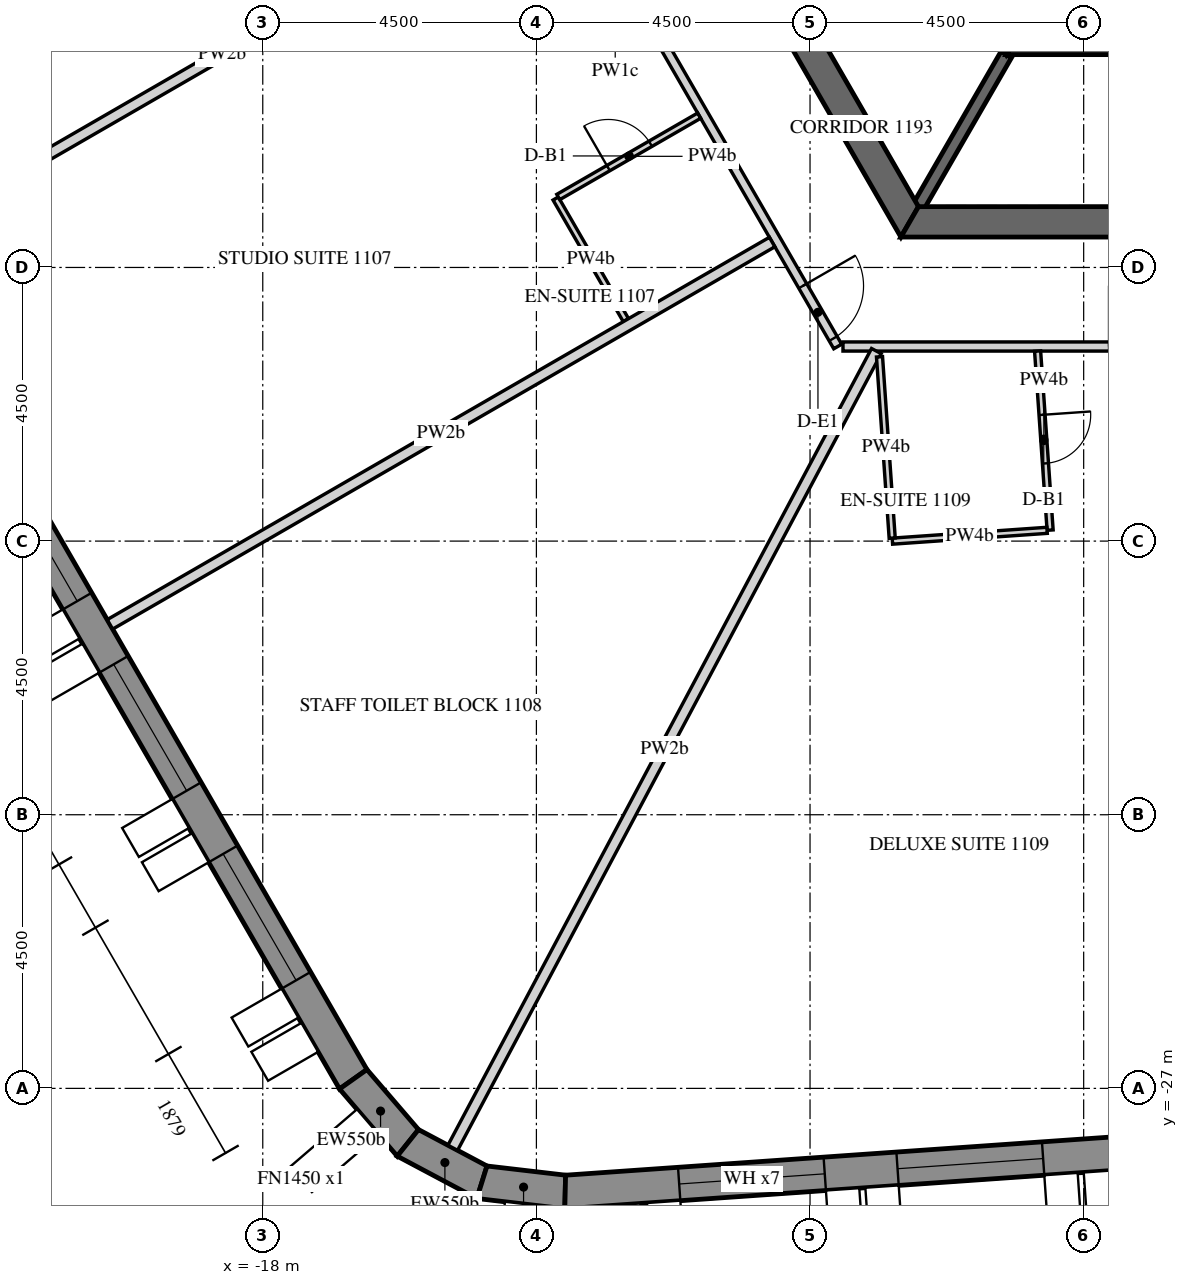
"""IFC4 building model, lengths in metres.
Left out: names, types, materials, properties, quantities, classifications, styles, units other than length and angle.
Written with IfcOpenShell. Run it as: python <this file> out.ifc"""

import sys

from ifc_helpers import new_model, si_unit, direction, frame, frame_2d, origin, place, context, subcontext, project, spatial, polyline, rectangle, outline, extrude, element, fill, save


model = new_model("IFC4")
c1 = context("Model", 3, precision=1e-05, world=origin(), true_north=direction((0.0, 1.0)))
c2 = subcontext(c1, "Body", "Model", "MODEL_VIEW")
j1 = project(units=[si_unit("LENGTHUNIT", "METRE"), si_unit("PLANEANGLEUNIT", "RADIAN")], contexts=[c1])
p1 = place(None, origin())
s1 = spatial("IfcSite", under=j1, at=p1, CompositionType="ELEMENT")
p2 = place(p1, origin())
s2 = spatial("IfcBuilding", under=s1, at=p2, CompositionType="ELEMENT")
p3 = place(p2, frame((0.0, 0.0, 152.7)))
s3 = spatial("IfcBuildingStorey", under=s2, at=p3, CompositionType="ELEMENT", Elevation=152.7)
p4 = place(p3, frame((-30.391, -2.811, 0.0), z_axis=(0.0, 0.0, 1.0), x_axis=(0.499998569178, -0.866026229868, 0.0)))
e1 = element("IfcWall", 1, at=p4, inside=s3, PredefinedType="SOLIDWALL", context=c2, shape_type="SweptSolid", body=[
    extrude(outline(polyline([(-0.022, -0.275), (27.783, -0.275), (27.732, 0.275), (0.022, 0.275), (-0.022, -0.275)])), origin(), (0.0, 0.0, 1.0), 3.75),
])
p5 = place(p4, frame((1.879, 0.0, 0.9)))
e2 = element("IfcOpeningElement", 2, at=p5, cuts=e1, PredefinedType="OPENING", context=c2, shape_type="SweptSolid", body=[
    extrude(rectangle(XDim=2.4, YDim=2.4, at=frame_2d((1.2, 1.2))), frame((0.0, 0.285, 0.0), z_axis=(0.0, -1.0, 0.0), x_axis=(1.0, 0.0, 0.0)), (0.0, 0.0, 1.0), 0.57),
])
p6 = place(p4, frame((5.479, 0.0, 0.9)))
e3 = element("IfcOpeningElement", 3, at=p6, cuts=e1, PredefinedType="OPENING", context=c2, shape_type="SweptSolid", body=[
    extrude(rectangle(XDim=2.4, YDim=2.4, at=frame_2d((1.2, 1.2))), frame((0.0, 0.285, 0.0), z_axis=(0.0, -1.0, 0.0), x_axis=(1.0, 0.0, 0.0)), (0.0, 0.0, 1.0), 0.57),
])
p7 = place(p4, frame((9.079, 0.0, 0.9)))
e4 = element("IfcOpeningElement", 4, at=p7, cuts=e1, PredefinedType="OPENING", context=c2, shape_type="SweptSolid", body=[
    extrude(rectangle(XDim=2.4, YDim=2.4, at=frame_2d((1.2, 1.2))), frame((0.0, 0.285, 0.0), z_axis=(0.0, -1.0, 0.0), x_axis=(1.0, 0.0, 0.0)), (0.0, 0.0, 1.0), 0.57),
])
p8 = place(p4, frame((12.679, 0.0, 0.9)))
e5 = element("IfcOpeningElement", 5, at=p8, cuts=e1, PredefinedType="OPENING", context=c2, shape_type="SweptSolid", body=[
    extrude(rectangle(XDim=2.4, YDim=2.4, at=frame_2d((1.2, 1.2))), frame((0.0, 0.285, 0.0), z_axis=(0.0, -1.0, 0.0), x_axis=(1.0, 0.0, 0.0)), (0.0, 0.0, 1.0), 0.57),
])
p9 = place(p4, frame((16.279, 0.0, 0.9)))
e6 = element("IfcOpeningElement", 6, at=p9, cuts=e1, PredefinedType="OPENING", context=c2, shape_type="SweptSolid", body=[
    extrude(rectangle(XDim=2.4, YDim=2.4, at=frame_2d((1.2, 1.2))), frame((0.0, 0.285, 0.0), z_axis=(0.0, -1.0, 0.0), x_axis=(1.0, 0.0, 0.0)), (0.0, 0.0, 1.0), 0.57),
])
p10 = place(p4, frame((19.879, 0.0, 0.9)))
e7 = element("IfcOpeningElement", 7, at=p10, cuts=e1, PredefinedType="OPENING", context=c2, shape_type="SweptSolid", body=[
    extrude(rectangle(XDim=2.4, YDim=2.4, at=frame_2d((1.2, 1.2))), frame((0.0, 0.285, 0.0), z_axis=(0.0, -1.0, 0.0), x_axis=(1.0, 0.0, 0.0)), (0.0, 0.0, 1.0), 0.57),
])
p11 = place(p4, frame((23.479, 0.0, 0.9)))
e8 = element("IfcOpeningElement", 8, at=p11, cuts=e1, PredefinedType="OPENING", context=c2, shape_type="SweptSolid", body=[
    extrude(rectangle(XDim=2.4, YDim=2.4, at=frame_2d((1.2, 1.2))), frame((0.0, 0.285, 0.0), z_axis=(0.0, -1.0, 0.0), x_axis=(1.0, 0.0, 0.0)), (0.0, 0.0, 1.0), 0.57),
])
p12 = place(p3, frame((-16.512, -26.85, 0.0), z_axis=(0.0, 0.0, 1.0), x_axis=(0.651621950847, -0.758543890078, 0.0)))
e9 = element("IfcWall", 9, at=p12, inside=s3, PredefinedType="SOLIDWALL", context=c2, shape_type="SweptSolid", body=[
    extrude(outline(polyline([(-0.026, -0.275), (1.431, -0.275), (1.327, 0.275), (0.026, 0.275), (-0.026, -0.275)])), origin(), (0.0, 0.0, 1.0), 3.75),
])
p13 = place(p3, frame((-15.614, -27.896, 0.0), z_axis=(0.0, 0.0, 1.0), x_axis=(0.882994189209, -0.469383917304, 0.0)))
e10 = element("IfcWall", 10, at=p13, inside=s3, PredefinedType="SOLIDWALL", context=c2, shape_type="SweptSolid", body=[
    extrude(outline(polyline([(-0.052, -0.275), (1.431, -0.275), (1.327, 0.275), (0.052, 0.275), (-0.052, -0.275)])), origin(), (0.0, 0.0, 1.0), 3.75),
])
p14 = place(p3, frame((-14.396, -28.543, 0.0), z_axis=(0.0, 0.0, 1.0), x_axis=(0.993232537394, -0.11614269956, 0.0)))
e11 = element("IfcWall", 11, at=p14, inside=s3, PredefinedType="SOLIDWALL", context=c2, shape_type="SweptSolid", body=[
    extrude(outline(polyline([(-0.052, -0.275), (1.405, -0.275), (1.353, 0.275), (0.052, 0.275), (-0.052, -0.275)])), origin(), (0.0, 0.0, 1.0), 3.75),
])
p15 = place(p3, frame((-13.026, -28.704, 0.0), z_axis=(0.0, 0.0, 1.0), x_axis=(0.99756406806, 0.069756219185, 0.0)))
e12 = element("IfcWall", 12, at=p15, inside=s3, PredefinedType="SOLIDWALL", context=c2, shape_type="SweptSolid", body=[
    extrude(outline(polyline([(-0.026, -0.275), (27.78, -0.275), (27.735, 0.275), (0.026, 0.275), (-0.026, -0.275)])), origin(), (0.0, 0.0, 1.0), 3.75),
])
p16 = place(p15, frame((1.879, 0.0, 0.9)))
e13 = element("IfcOpeningElement", 13, at=p16, cuts=e12, PredefinedType="OPENING", context=c2, shape_type="SweptSolid", body=[
    extrude(rectangle(XDim=2.4, YDim=2.4, at=frame_2d((1.2, 1.2))), frame((0.0, 0.285, 0.0), z_axis=(0.0, -1.0, 0.0), x_axis=(1.0, 0.0, 0.0)), (0.0, 0.0, 1.0), 0.57),
])
p17 = place(p15, frame((5.479, 0.0, 0.9)))
e14 = element("IfcOpeningElement", 14, at=p17, cuts=e12, PredefinedType="OPENING", context=c2, shape_type="SweptSolid", body=[
    extrude(rectangle(XDim=2.4, YDim=2.4, at=frame_2d((1.2, 1.2))), frame((0.0, 0.285, 0.0), z_axis=(0.0, -1.0, 0.0), x_axis=(1.0, 0.0, 0.0)), (0.0, 0.0, 1.0), 0.57),
])
p18 = place(p15, frame((9.079, 0.0, 0.9)))
e15 = element("IfcOpeningElement", 15, at=p18, cuts=e12, PredefinedType="OPENING", context=c2, shape_type="SweptSolid", body=[
    extrude(rectangle(XDim=2.4, YDim=2.4, at=frame_2d((1.2, 1.2))), frame((0.0, 0.285, 0.0), z_axis=(0.0, -1.0, 0.0), x_axis=(1.0, 0.0, 0.0)), (0.0, 0.0, 1.0), 0.57),
])
p19 = place(p15, frame((12.679, 0.0, 0.9)))
e16 = element("IfcOpeningElement", 16, at=p19, cuts=e12, PredefinedType="OPENING", context=c2, shape_type="SweptSolid", body=[
    extrude(rectangle(XDim=2.4, YDim=2.4, at=frame_2d((1.2, 1.2))), frame((0.0, 0.285, 0.0), z_axis=(0.0, -1.0, 0.0), x_axis=(1.0, 0.0, 0.0)), (0.0, 0.0, 1.0), 0.57),
])
p20 = place(p15, frame((16.279, 0.0, 0.9)))
e17 = element("IfcOpeningElement", 17, at=p20, cuts=e12, PredefinedType="OPENING", context=c2, shape_type="SweptSolid", body=[
    extrude(rectangle(XDim=2.4, YDim=2.4, at=frame_2d((1.2, 1.2))), frame((0.0, 0.285, 0.0), z_axis=(0.0, -1.0, 0.0), x_axis=(1.0, 0.0, 0.0)), (0.0, 0.0, 1.0), 0.57),
])
p21 = place(p15, frame((19.879, 0.0, 0.9)))
e18 = element("IfcOpeningElement", 18, at=p21, cuts=e12, PredefinedType="OPENING", context=c2, shape_type="SweptSolid", body=[
    extrude(rectangle(XDim=2.4, YDim=2.4, at=frame_2d((1.2, 1.2))), frame((0.0, 0.285, 0.0), z_axis=(0.0, -1.0, 0.0), x_axis=(1.0, 0.0, 0.0)), (0.0, 0.0, 1.0), 0.57),
])
p22 = place(p15, frame((23.479, 0.0, 0.9)))
e19 = element("IfcOpeningElement", 19, at=p22, cuts=e12, PredefinedType="OPENING", context=c2, shape_type="SweptSolid", body=[
    extrude(rectangle(XDim=2.4, YDim=2.4, at=frame_2d((1.2, 1.2))), frame((0.0, 0.285, 0.0), z_axis=(0.0, -1.0, 0.0), x_axis=(1.0, 0.0, 0.0)), (0.0, 0.0, 1.0), 0.57),
])
p23 = place(p3, frame((-14.722, 0.0, 0.0), z_axis=(0.0, 0.0, 1.0), x_axis=(0.50000571537, -0.866022103989, 0.0)))
e20 = element("IfcWall", 20, at=p23, inside=s3, PredefinedType="SHEAR", context=c2, shape_type="SweptSolid", body=[
    extrude(outline(polyline([(-0.144, -0.25), (14.867, -0.25), (14.578, 0.25), (0.144, 0.25), (-0.144, -0.25)])), origin(), (0.0, 0.0, 1.0), 3.75),
])
p24 = place(p23, frame((6.432, 0.0, 0.0)))
e21 = element("IfcOpeningElement", 21, at=p24, cuts=e20, PredefinedType="OPENING", context=c2, shape_type="SweptSolid", body=[
    extrude(rectangle(XDim=1.8, YDim=2.4, at=frame_2d((0.9, 1.2))), frame((0.0, 0.26, 0.0), z_axis=(0.0, -1.0, 0.0), x_axis=(1.0, 0.0, 0.0)), (0.0, 0.0, 1.0), 0.52),
])
p25 = place(p3, frame((-7.361, -12.75, 0.0), z_axis=(0.0, 0.0, 1.0), x_axis=(1.0, 0.0, 0.0)))
e22 = element("IfcWall", 22, at=p25, inside=s3, PredefinedType="SHEAR", context=c2, shape_type="SweptSolid", body=[
    extrude(outline(polyline([(-0.144, -0.25), (14.866, -0.25), (14.578, 0.25), (0.144, 0.25), (-0.144, -0.25)])), origin(), (0.0, 0.0, 1.0), 3.75),
])
p26 = place(p25, frame((6.761, 0.0, 0.0)))
e23 = element("IfcOpeningElement", 23, at=p26, cuts=e22, PredefinedType="OPENING", context=c2, shape_type="SweptSolid", body=[
    extrude(rectangle(XDim=1.2, YDim=2.4, at=frame_2d((0.6, 1.2))), frame((0.0, 0.26, 0.0), z_axis=(0.0, -1.0, 0.0), x_axis=(1.0, 0.0, 0.0)), (0.0, 0.0, 1.0), 0.52),
])
p27 = place(p3, frame((-11.345, 0.0, 0.0), z_axis=(0.0, 0.0, 1.0), x_axis=(0.499995046907, -0.866028263435, 0.0)))
e24 = element("IfcWall", 24, at=p27, inside=s3, PredefinedType="SHEAR", context=c2, shape_type="SweptSolid", body=[
    extrude(outline(polyline([(-0.101, -0.175), (11.446, -0.175), (11.244, 0.175), (0.101, 0.175), (-0.101, -0.175)])), origin(), (0.0, 0.0, 1.0), 3.75),
])
p28 = place(p27, frame((4.744, 0.0, 0.0)))
e25 = element("IfcOpeningElement", 25, at=p28, cuts=e24, PredefinedType="OPENING", context=c2, shape_type="SweptSolid", body=[
    extrude(rectangle(XDim=1.8, YDim=2.4, at=frame_2d((0.9, 1.2))), frame((0.0, 0.185, 0.0), z_axis=(0.0, -1.0, 0.0), x_axis=(1.0, 0.0, 0.0)), (0.0, 0.0, 1.0), 0.37),
])
p29 = place(p3, frame((-5.673, -9.825, 0.0), z_axis=(0.0, 0.0, 1.0), x_axis=(1.0, 0.0, 0.0)))
e26 = element("IfcWall", 26, at=p29, inside=s3, PredefinedType="SHEAR", context=c2, shape_type="SweptSolid", body=[
    extrude(outline(polyline([(-0.101, -0.175), (11.446, -0.175), (11.244, 0.175), (0.101, 0.175), (-0.101, -0.175)])), origin(), (0.0, 0.0, 1.0), 3.75),
])
p30 = place(p3, frame((-5.773, -10.0, 0.0), z_axis=(0.0, 0.0, 1.0), x_axis=(-0.499995765644, -0.866027848477, 0.0)))
e27 = element("IfcWall", 27, at=p30, inside=s3, PredefinedType="SHEAR", context=c2, shape_type="SweptSolid", body=[
    extrude(rectangle(XDim=2.887, YDim=0.2, at=frame_2d((1.443, 0.0))), origin(), (0.0, 0.0, 1.0), 3.75),
])
p31 = place(p3, frame((-15.863, -2.125, 0.0), z_axis=(0.0, 0.0, 1.0), x_axis=(0.500008833422, -0.866020303746, 0.0)))
e28 = element("IfcWall", 28, at=p31, inside=s3, PredefinedType="PARTITIONING", context=c2, shape_type="SweptSolid", body=[
    extrude(rectangle(XDim=14.636, YDim=0.15, at=frame_2d((7.318, 0.0))), origin(), (0.0, 0.0, 1.0), 2.823),
])
p32 = place(p31, frame((0.961, 0.0, 0.0)))
e29 = element("IfcOpeningElement", 29, at=p32, cuts=e28, PredefinedType="OPENING", context=c2, shape_type="SweptSolid", body=[
    extrude(rectangle(XDim=1.0, YDim=2.1, at=frame_2d((0.5, 1.05))), frame((0.0, 0.085, 0.0), z_axis=(0.0, -1.0, 0.0), x_axis=(1.0, 0.0, 0.0)), (0.0, 0.0, 1.0), 0.17),
])
p33 = place(p31, frame((7.309, 0.0, 0.0)))
e30 = element("IfcOpeningElement", 30, at=p33, cuts=e28, PredefinedType="OPENING", context=c2, shape_type="SweptSolid", body=[
    extrude(rectangle(XDim=1.0, YDim=2.1, at=frame_2d((0.5, 1.05))), frame((0.0, 0.085, 0.0), z_axis=(0.0, -1.0, 0.0), x_axis=(1.0, 0.0, 0.0)), (0.0, 0.0, 1.0), 0.17),
])
p34 = place(p31, frame((13.486, 0.0, 0.0)))
e31 = element("IfcOpeningElement", 31, at=p34, cuts=e28, PredefinedType="OPENING", context=c2, shape_type="SweptSolid", body=[
    extrude(rectangle(XDim=1.0, YDim=2.1, at=frame_2d((0.5, 1.05))), frame((0.0, 0.085, 0.0), z_axis=(0.0, -1.0, 0.0), x_axis=(1.0, 0.0, 0.0)), (0.0, 0.0, 1.0), 0.17),
])
p35 = place(p3, frame((-8.458, -14.8, 0.0), z_axis=(0.0, 0.0, 1.0), x_axis=(1.0, 0.0, 0.0)))
e32 = element("IfcWall", 32, at=p35, inside=s3, PredefinedType="PARTITIONING", context=c2, shape_type="SweptSolid", body=[
    extrude(rectangle(XDim=14.549, YDim=0.15, at=frame_2d((7.275, 0.0))), origin(), (0.0, 0.0, 1.0), 2.823),
])
p36 = place(p35, frame((4.375, 0.0, 0.0)))
e33 = element("IfcOpeningElement", 33, at=p36, cuts=e32, PredefinedType="OPENING", context=c2, shape_type="SweptSolid", body=[
    extrude(rectangle(XDim=1.0, YDim=2.1, at=frame_2d((0.5, 1.05))), frame((0.0, 0.085, 0.0), z_axis=(0.0, -1.0, 0.0), x_axis=(1.0, 0.0, 0.0)), (0.0, 0.0, 1.0), 0.17),
])
p37 = place(p35, frame((7.872, 0.0, 0.0)))
e34 = element("IfcOpeningElement", 34, at=p37, cuts=e32, PredefinedType="OPENING", context=c2, shape_type="SweptSolid", body=[
    extrude(rectangle(XDim=1.0, YDim=2.1, at=frame_2d((0.5, 1.05))), frame((0.0, 0.085, 0.0), z_axis=(0.0, -1.0, 0.0), x_axis=(1.0, 0.0, 0.0)), (0.0, 0.0, 1.0), 0.17),
])
p38 = place(p35, frame((10.609, 0.0, 0.0)))
e35 = element("IfcOpeningElement", 35, at=p38, cuts=e32, PredefinedType="OPENING", context=c2, shape_type="SweptSolid", body=[
    extrude(rectangle(XDim=1.0, YDim=2.1, at=frame_2d((0.5, 1.05))), frame((0.0, 0.085, 0.0), z_axis=(0.0, -1.0, 0.0), x_axis=(1.0, 0.0, 0.0)), (0.0, 0.0, 1.0), 0.17),
])
p39 = place(p3, frame((-19.158, -6.116, 0.0), z_axis=(0.0, 0.0, 1.0), x_axis=(-0.866021400173, -0.500006934395, 0.0)))
e36 = element("IfcWall", 36, at=p39, inside=s3, PredefinedType="PARTITIONING", context=c2, shape_type="SweptSolid", body=[
    extrude(rectangle(XDim=7.8, YDim=0.1, at=frame_2d((3.9, 0.0))), origin(), (0.0, 0.0, 1.0), 2.823),
])
p40 = place(p3, frame((-24.114, -13.134, 0.0), z_axis=(0.0, 0.0, 1.0), x_axis=(0.866024255907, 0.500001988177, 0.0)))
e37 = element("IfcWall", 37, at=p40, inside=s3, PredefinedType="PARTITIONING", context=c2, shape_type="SweptSolid", body=[
    extrude(rectangle(XDim=12.575, YDim=0.18, at=frame_2d((6.288, 0.0))), origin(), (0.0, 0.0, 1.0), 2.823),
])
p41 = place(p3, frame((-12.028, -14.367, 0.0), z_axis=(0.0, 0.0, 1.0), x_axis=(-0.500015210774, 0.866016621662, 0.0)))
e38 = element("IfcWall", 38, at=p41, inside=s3, PredefinedType="PARTITIONING", context=c2, shape_type="SweptSolid", body=[
    extrude(rectangle(XDim=2.31, YDim=0.1, at=frame_2d((1.155, 0.0))), origin(), (0.0, 0.0, 1.0), 2.823),
])
p42 = place(p3, frame((-13.14, -12.341, 0.0), z_axis=(0.0, 0.0, 1.0), x_axis=(0.86604424267, 0.499967368674, 0.0)))
e39 = element("IfcWall", 39, at=p42, inside=s3, PredefinedType="PARTITIONING", context=c2, shape_type="SweptSolid", body=[
    extrude(rectangle(XDim=2.675, YDim=0.1, at=frame_2d((1.337, 0.0))), origin(), (0.0, 0.0, 1.0), 2.823),
])
p43 = place(p42, frame((0.95, 0.0, 0.0)))
e40 = element("IfcOpeningElement", 40, at=p43, cuts=e39, PredefinedType="OPENING", context=c2, shape_type="SweptSolid", body=[
    extrude(rectangle(XDim=0.8, YDim=2.1, at=frame_2d((0.4, 1.05))), frame((0.0, 0.06, 0.0), z_axis=(0.0, -1.0, 0.0), x_axis=(1.0, 0.0, 0.0)), (0.0, 0.0, 1.0), 0.12),
])
p44 = place(p3, frame((-20.513, -19.37, 0.0), z_axis=(0.0, 0.0, 1.0), x_axis=(0.866019402111, 0.500010395058, 0.0)))
e41 = element("IfcWall", 41, at=p44, inside=s3, PredefinedType="PARTITIONING", context=c2, shape_type="SweptSolid", body=[
    extrude(rectangle(XDim=12.575, YDim=0.18, at=frame_2d((6.288, 0.0))), origin(), (0.0, 0.0, 1.0), 2.823),
])
p45 = place(p3, frame((-14.876, -27.977, 0.0), z_axis=(0.0, 0.0, 1.0), x_axis=(0.469475175214, 0.882945672088, 0.0)))
e42 = element("IfcWall", 42, at=p45, inside=s3, PredefinedType="PARTITIONING", context=c2, shape_type="SweptSolid", body=[
    extrude(rectangle(XDim=14.839, YDim=0.18, at=frame_2d((7.419, 0.0))), origin(), (0.0, 0.0, 1.0), 2.823),
])
p46 = place(p3, frame((-5.258, -14.875, 0.0), z_axis=(0.0, 0.0, 1.0), x_axis=(0.069812665072, -0.997560119389, 0.0)))
e43 = element("IfcWall", 43, at=p46, inside=s3, PredefinedType="PARTITIONING", context=c2, shape_type="SweptSolid", body=[
    extrude(rectangle(XDim=2.951, YDim=0.1, at=frame_2d((1.476, 0.0))), origin(), (0.0, 0.0, 1.0), 2.823),
])
p47 = place(p46, frame((1.052, 0.0, 0.0)))
e44 = element("IfcOpeningElement", 44, at=p47, cuts=e43, PredefinedType="OPENING", context=c2, shape_type="SweptSolid", body=[
    extrude(rectangle(XDim=0.8, YDim=2.1, at=frame_2d((0.4, 1.05))), frame((0.0, 0.06, 0.0), z_axis=(0.0, -1.0, 0.0), x_axis=(1.0, 0.0, 0.0)), (0.0, 0.0, 1.0), 0.12),
])
p48 = place(p3, frame((-5.102, -17.823, 0.0), z_axis=(0.0, 0.0, 1.0), x_axis=(-0.997561167558, -0.069797686069, 0.0)))
e45 = element("IfcWall", 45, at=p48, inside=s3, PredefinedType="PARTITIONING", context=c2, shape_type="SweptSolid", body=[
    extrude(rectangle(XDim=2.55, YDim=0.1, at=frame_2d((1.275, 0.0))), origin(), (0.0, 0.0, 1.0), 2.823),
])
p49 = place(p3, frame((-7.649, -17.951, 0.0), z_axis=(0.0, 0.0, 1.0), x_axis=(-0.069760844897, 0.997563744589, 0.0)))
e46 = element("IfcWall", 46, at=p49, inside=s3, PredefinedType="PARTITIONING", context=c2, shape_type="SweptSolid", body=[
    extrude(rectangle(XDim=2.989, YDim=0.1, at=frame_2d((1.494, 0.0))), origin(), (0.0, 0.0, 1.0), 2.823),
])
p50 = place(p9, frame((0.0, 0.205, 0.0)))
e47 = element("IfcWindow", 47, at=p50, inside=s3, PartitioningType="DOUBLE_PANEL_VERTICAL", PredefinedType="WINDOW", context=c2, shape_type="SweptSolid", body=[
    extrude(rectangle(XDim=2.4, YDim=2.4, at=frame_2d((1.2, 1.2))), frame((0.0, 0.03, 0.0), z_axis=(0.0, -1.0, 0.0), x_axis=(1.0, 0.0, 0.0)), (0.0, 0.0, 1.0), 0.06),
])
fill(e6, e47)
p51 = place(p10, frame((0.0, 0.205, 0.0)))
e48 = element("IfcWindow", 48, at=p51, inside=s3, PartitioningType="DOUBLE_PANEL_VERTICAL", PredefinedType="WINDOW", context=c2, shape_type="SweptSolid", body=[
    extrude(rectangle(XDim=2.4, YDim=2.4, at=frame_2d((1.2, 1.2))), frame((0.0, 0.03, 0.0), z_axis=(0.0, -1.0, 0.0), x_axis=(1.0, 0.0, 0.0)), (0.0, 0.0, 1.0), 0.06),
])
fill(e7, e48)
p52 = place(p11, frame((0.0, 0.205, 0.0)))
e49 = element("IfcWindow", 49, at=p52, inside=s3, PartitioningType="DOUBLE_PANEL_VERTICAL", PredefinedType="WINDOW", context=c2, shape_type="SweptSolid", body=[
    extrude(rectangle(XDim=2.4, YDim=2.4, at=frame_2d((1.2, 1.2))), frame((0.0, 0.03, 0.0), z_axis=(0.0, -1.0, 0.0), x_axis=(1.0, 0.0, 0.0)), (0.0, 0.0, 1.0), 0.06),
])
fill(e8, e49)
p53 = place(p16, frame((0.0, 0.205, 0.0)))
e50 = element("IfcWindow", 50, at=p53, inside=s3, PartitioningType="DOUBLE_PANEL_VERTICAL", PredefinedType="WINDOW", context=c2, shape_type="SweptSolid", body=[
    extrude(rectangle(XDim=2.4, YDim=2.4, at=frame_2d((1.2, 1.2))), frame((0.0, 0.03, 0.0), z_axis=(0.0, -1.0, 0.0), x_axis=(1.0, 0.0, 0.0)), (0.0, 0.0, 1.0), 0.06),
])
fill(e13, e50)
p54 = place(p17, frame((0.0, 0.205, 0.0)))
e51 = element("IfcWindow", 51, at=p54, inside=s3, PartitioningType="DOUBLE_PANEL_VERTICAL", PredefinedType="WINDOW", context=c2, shape_type="SweptSolid", body=[
    extrude(rectangle(XDim=2.4, YDim=2.4, at=frame_2d((1.2, 1.2))), frame((0.0, 0.03, 0.0), z_axis=(0.0, -1.0, 0.0), x_axis=(1.0, 0.0, 0.0)), (0.0, 0.0, 1.0), 0.06),
])
fill(e14, e51)
p55 = place(p43, origin())
e52 = element("IfcDoor", 52, at=p55, inside=s3, OperationType="SINGLE_SWING_RIGHT", PredefinedType="DOOR", context=c2, shape_type="SweptSolid", body=[
    extrude(rectangle(XDim=0.8, YDim=2.1, at=frame_2d((0.4, 1.05))), frame((0.0, 0.025, 0.0), z_axis=(0.0, -1.0, 0.0), x_axis=(1.0, 0.0, 0.0)), (0.0, 0.0, 1.0), 0.05),
])
fill(e40, e52)
p56 = place(p34, origin())
e53 = element("IfcDoor", 53, at=p56, inside=s3, OperationType="SINGLE_SWING_LEFT", PredefinedType="DOOR", context=c2, shape_type="SweptSolid", body=[
    extrude(rectangle(XDim=1.0, YDim=2.1, at=frame_2d((0.5, 1.05))), frame((0.0, 0.025, 0.0), z_axis=(0.0, -1.0, 0.0), x_axis=(1.0, 0.0, 0.0)), (0.0, 0.0, 1.0), 0.05),
])
fill(e31, e53)
p57 = place(p47, origin())
e54 = element("IfcDoor", 54, at=p57, inside=s3, OperationType="SINGLE_SWING_LEFT", PredefinedType="DOOR", context=c2, shape_type="SweptSolid", body=[
    extrude(rectangle(XDim=0.8, YDim=2.1, at=frame_2d((0.4, 1.05))), frame((0.0, 0.025, 0.0), z_axis=(0.0, -1.0, 0.0), x_axis=(1.0, 0.0, 0.0)), (0.0, 0.0, 1.0), 0.05),
])
fill(e44, e54)
save(model, sys.argv[1])
